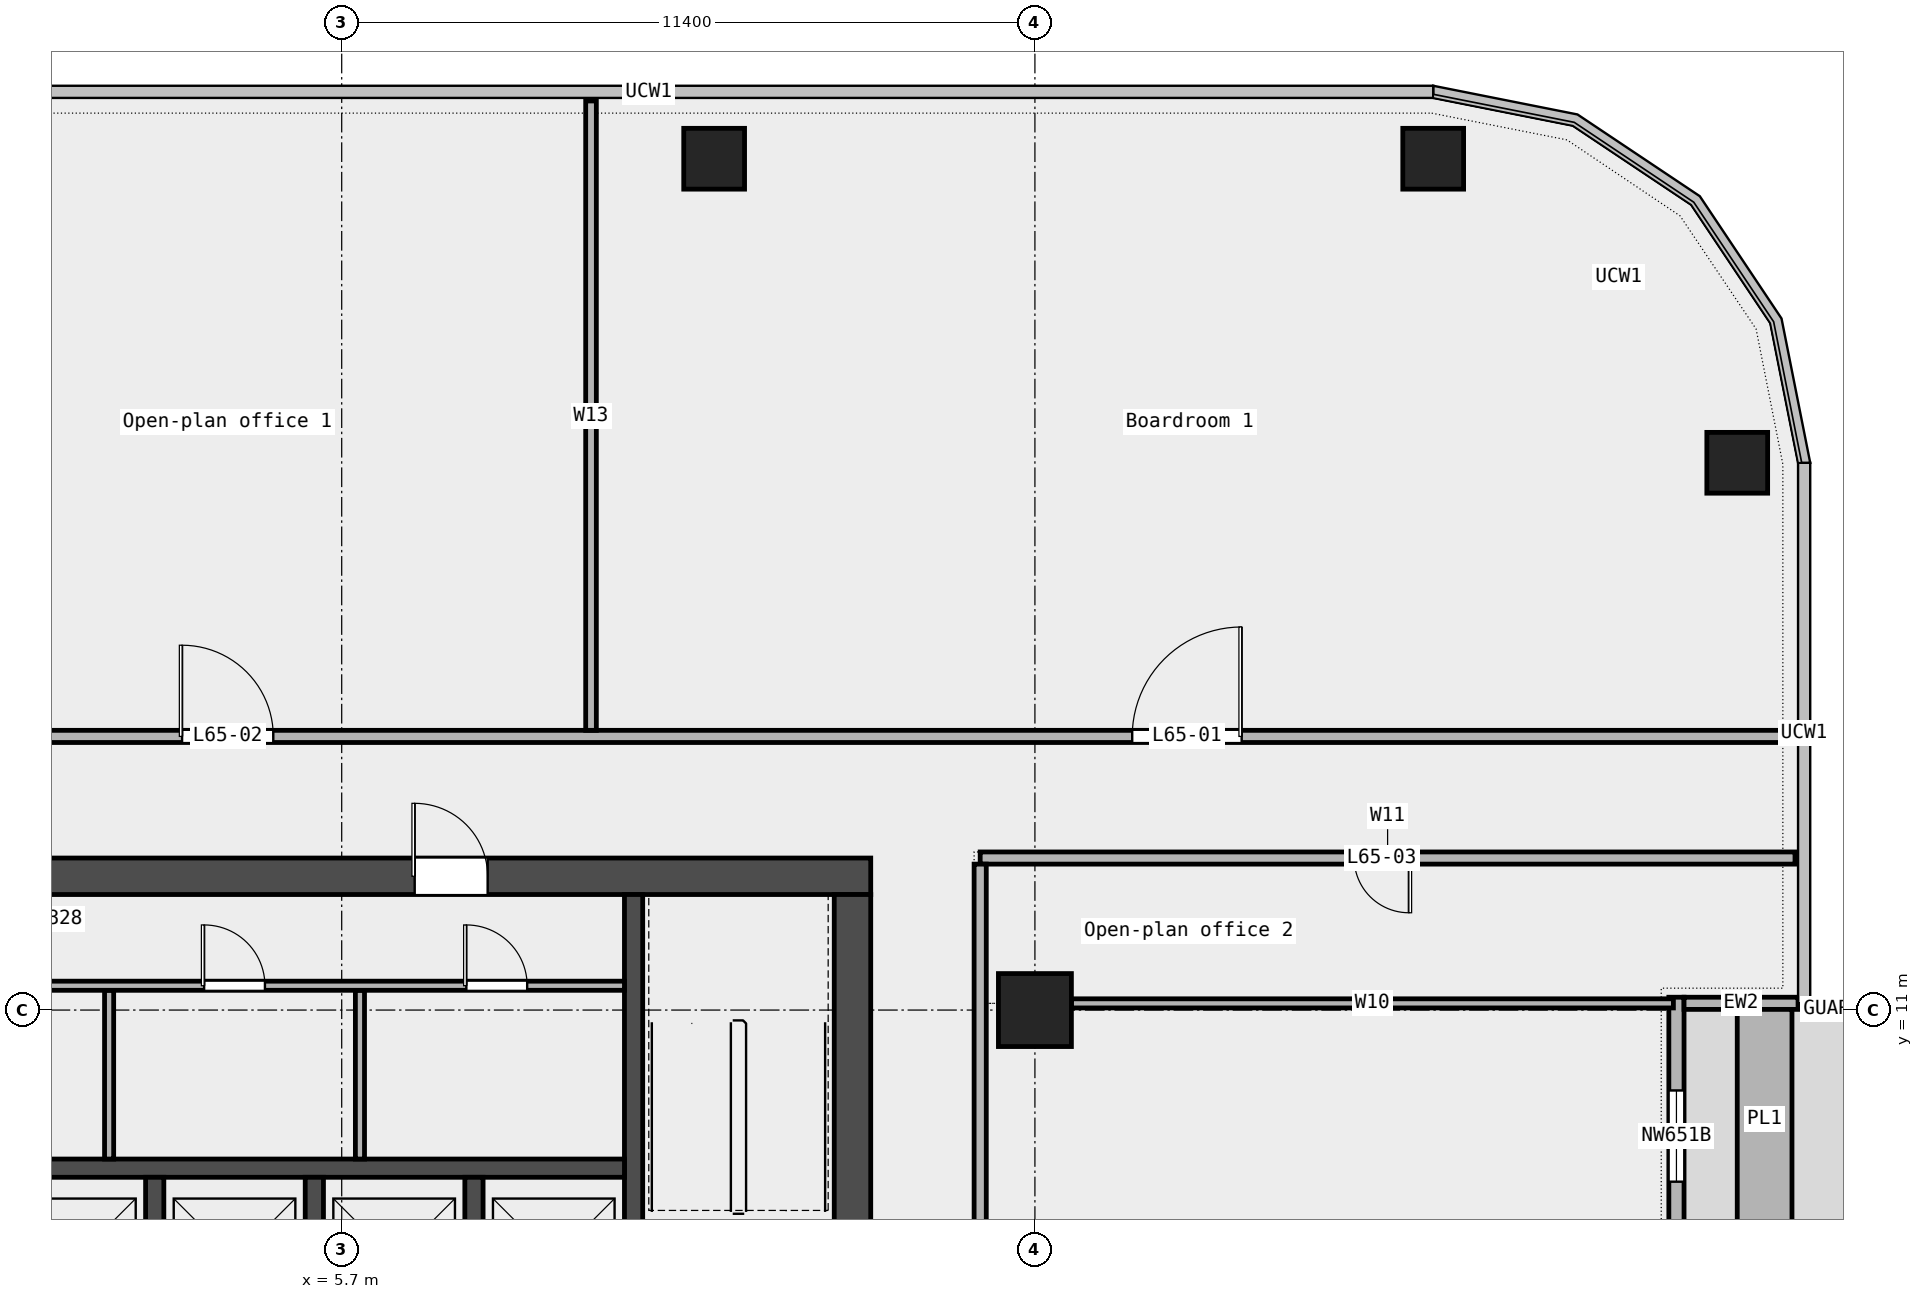
"""IFC4 building model, lengths in metres.
Left out: names, types, materials, properties, quantities, classifications, styles, units other than length and angle.
Written with IfcOpenShell. Run it as: python <this file> out.ifc"""

import sys

from ifc_helpers import new_model, si_unit, direction, frame, frame_2d, origin, origin_2d, place, context, subcontext, project, spatial, rectangle, extrude, element, fill, save


model = new_model("IFC4")
c1 = context("Model", 3, precision=1e-05, world=origin(), true_north=direction((0.0, 1.0)))
c2 = subcontext(c1, "Body", "Model", "MODEL_VIEW")
j1 = project(units=[si_unit("LENGTHUNIT", "METRE"), si_unit("PLANEANGLEUNIT", "RADIAN")], contexts=[c1])
p1 = place(None, origin())
s1 = spatial("IfcSite", under=j1, at=p1, CompositionType="ELEMENT")
p2 = place(p1, origin())
s2 = spatial("IfcBuilding", under=s1, at=p2, CompositionType="ELEMENT")
p3 = place(p2, frame((0.0, 0.0, 299.4)))
s3 = spatial("IfcBuildingStorey", under=s2, at=p3, CompositionType="ELEMENT", Elevation=299.4)
for number, where, z_axis, x_axis in (
    (1, (28.65, 20.0, 0.0), (0.0, 0.0, 1.0), (1.0, 0.0, 0.0)),
    (2, (23.65, 25.0, 0.0), (0.0, 0.0, 1.0), (1.0, 0.0, 0.0)),
    (3, (11.825, 25.0, 0.0), (0.0, 0.0, 1.0), (1.0, 0.0, 0.0)),
):
    element("IfcColumn", number, at=place(p3, frame(where, z_axis=z_axis, x_axis=x_axis)), inside=s3, PredefinedType="COLUMN", context=c2, shape_type="SweptSolid", body=[
        extrude(rectangle(XDim=1.0, YDim=1.0, at=origin_2d()), origin(), (0.0, 0.0, 1.0), 3.6),
    ])
p4 = place(p3, frame((17.1, 11.0, 0.0), z_axis=(0.0, 0.0, 1.0), x_axis=(1.0, 0.0, 0.0)))
e4 = element("IfcColumn", 4, at=p4, inside=s3, PredefinedType="COLUMN", context=c2, shape_type="SweptSolid", body=[
    extrude(rectangle(XDim=1.2, YDim=1.2, at=origin_2d()), origin(), (0.0, 0.0, 1.0), 3.6),
])
p5 = place(p3, frame((27.65, -2.322, 0.0), z_axis=(0.0, 0.0, 1.0), x_axis=(0.0, 1.0, 0.0)))
e5 = element("IfcWall", 5, at=p5, inside=s3, PredefinedType="STANDARD", context=c2, shape_type="SweptSolid", body=[
    extrude(rectangle(XDim=13.533, YDim=0.25, at=frame_2d((6.767, 0.0))), origin(), (0.0, 0.0, 1.0), 3.6),
])
p6 = place(p5, frame((1.5, 0.0, 0.45)))
e6 = element("IfcOpeningElement", 6, at=p6, cuts=e5, PredefinedType="OPENING", context=c2, shape_type="SweptSolid", body=[
    extrude(rectangle(XDim=1.5, YDim=2.4, at=frame_2d((0.75, 1.2))), frame((0.0, 0.137, 0.0), z_axis=(0.0, -1.0, 0.0), x_axis=(1.0, 0.0, 0.0)), (0.0, 0.0, 1.0), 0.274),
])
p7 = place(p5, frame((5.75, 0.0, 0.0)))
e7 = element("IfcOpeningElement", 7, at=p7, cuts=e5, PredefinedType="OPENING", context=c2, shape_type="SweptSolid", body=[
    extrude(rectangle(XDim=1.8, YDim=2.4, at=frame_2d((0.9, 1.2))), frame((0.0, 0.137, 0.0), z_axis=(0.0, -1.0, 0.0), x_axis=(1.0, 0.0, 0.0)), (0.0, 0.0, 1.0), 0.274),
])
p8 = place(p5, frame((10.5, 0.0, 0.45)))
e8 = element("IfcOpeningElement", 8, at=p8, cuts=e5, PredefinedType="OPENING", context=c2, shape_type="SweptSolid", body=[
    extrude(rectangle(XDim=1.5, YDim=2.4, at=frame_2d((0.75, 1.2))), frame((0.0, 0.137, 0.0), z_axis=(0.0, -1.0, 0.0), x_axis=(1.0, 0.0, 0.0)), (0.0, 0.0, 1.0), 0.274),
])
p9 = place(p3, frame((29.65, 11.111, 0.0), z_axis=(0.0, 0.0, 1.0), x_axis=(-1.0, 0.0, 0.0)))
e9 = element("IfcWall", 9, at=p9, inside=s3, PredefinedType="STANDARD", context=c2, shape_type="SweptSolid", body=[
    extrude(rectangle(XDim=1.875, YDim=0.2, at=frame_2d((0.938, 0.0))), origin(), (0.0, 0.0, 1.0), 3.6),
])
p10 = place(p3, frame((29.1, 7.411, 0.0), z_axis=(0.0, 0.0, 1.0), x_axis=(0.0, 1.0, 0.0)))
e10 = element("IfcWall", 10, at=p10, inside=s3, PredefinedType="STANDARD", context=c2, shape_type="SweptSolid", body=[
    extrude(rectangle(XDim=3.6, YDim=0.9, at=frame_2d((1.8, 0.0))), origin(), (0.0, 0.0, 1.0), 0.7),
])
p11 = place(p3, frame((17.7, 11.11, 0.0), z_axis=(0.0, 0.0, 1.0), x_axis=(1.0, 0.0, 0.0)))
e11 = element("IfcWall", 11, at=p11, inside=s3, PredefinedType="PARTITIONING", context=c2, shape_type="SweptSolid", body=[
    extrude(rectangle(XDim=9.9, YDim=0.15, at=frame_2d((4.95, 0.0))), origin(), (0.0, 0.0, 1.0), 3.6),
])
p12 = place(p3, frame((16.2, 13.5, 0.0), z_axis=(0.0, 0.0, 1.0), x_axis=(1.0, 0.0, 0.0)))
e12 = element("IfcWall", 12, at=p12, inside=s3, PredefinedType="PARTITIONING", context=c2, shape_type="SweptSolid", body=[
    extrude(rectangle(XDim=13.4, YDim=0.2, at=frame_2d((6.7, 0.0))), origin(), (0.0, 0.0, 1.0), 3.6),
])
p13 = place(p12, frame((6.15, 0.0, 0.0)))
e13 = element("IfcOpeningElement", 13, at=p13, cuts=e12, PredefinedType="OPENING", context=c2, shape_type="SweptSolid", body=[
    extrude(rectangle(XDim=0.9, YDim=2.1, at=frame_2d((0.45, 1.05))), frame((0.0, 0.112, 0.0), z_axis=(0.0, -1.0, 0.0), x_axis=(1.0, 0.0, 0.0)), (0.0, 0.0, 1.0), 0.224),
])
p14 = place(p3, frame((-29.6, 15.5, 0.0), z_axis=(0.0, 0.0, 1.0), x_axis=(1.0, 0.0, 0.0)))
e14 = element("IfcWall", 14, at=p14, inside=s3, PredefinedType="PARTITIONING", context=c2, shape_type="SweptSolid", body=[
    extrude(rectangle(XDim=59.2, YDim=0.2, at=frame_2d((29.6, 0.0))), origin(), (0.0, 0.0, 1.0), 3.6),
])
p15 = place(p14, frame((48.3, 0.0, 0.0)))
e15 = element("IfcOpeningElement", 15, at=p15, cuts=e14, PredefinedType="OPENING", context=c2, shape_type="SweptSolid", body=[
    extrude(rectangle(XDim=1.8, YDim=2.1, at=frame_2d((0.9, 1.05))), frame((0.0, 0.112, 0.0), z_axis=(0.0, -1.0, 0.0), x_axis=(1.0, 0.0, 0.0)), (0.0, 0.0, 1.0), 0.224),
])
p16 = place(p14, frame((32.675, 0.0, 0.0)))
e16 = element("IfcOpeningElement", 16, at=p16, cuts=e14, PredefinedType="OPENING", context=c2, shape_type="SweptSolid", body=[
    extrude(rectangle(XDim=1.5, YDim=2.1, at=frame_2d((0.75, 1.05))), frame((0.0, 0.112, 0.0), z_axis=(0.0, -1.0, 0.0), x_axis=(1.0, 0.0, 0.0)), (0.0, 0.0, 1.0), 0.224),
])
p17 = place(p14, frame((6.625, 0.0, 0.0)))
e17 = element("IfcOpeningElement", 17, at=p17, cuts=e14, PredefinedType="OPENING", context=c2, shape_type="SweptSolid", body=[
    extrude(rectangle(XDim=1.5, YDim=2.1, at=frame_2d((0.75, 1.05))), frame((0.0, 0.112, 0.0), z_axis=(0.0, -1.0, 0.0), x_axis=(1.0, 0.0, 0.0)), (0.0, 0.0, 1.0), 0.224),
])
p18 = place(p14, frame((20.25, 0.0, 0.0)))
e18 = element("IfcOpeningElement", 18, at=p18, cuts=e14, PredefinedType="OPENING", context=c2, shape_type="SweptSolid", body=[
    extrude(rectangle(XDim=1.5, YDim=2.1, at=frame_2d((0.75, 1.05))), frame((0.0, 0.112, 0.0), z_axis=(0.0, -1.0, 0.0), x_axis=(1.0, 0.0, 0.0)), (0.0, 0.0, 1.0), 0.224),
])
p19 = place(p3, frame((9.8, 15.6, 0.0), z_axis=(0.0, 0.0, 1.0), x_axis=(0.0, 1.0, 0.0)))
e19 = element("IfcWall", 19, at=p19, inside=s3, PredefinedType="PARTITIONING", context=c2, shape_type="SweptSolid", body=[
    extrude(rectangle(XDim=10.35, YDim=0.175, at=frame_2d((5.175, 0.0))), origin(), (0.0, 0.0, 1.0), 3.6),
])
p20 = place(p3, frame((16.2, -7.1, 0.0), z_axis=(0.0, 0.0, 1.0), x_axis=(0.0, 1.0, 0.0)))
e20 = element("IfcWall", 20, at=p20, inside=s3, PredefinedType="PARTITIONING", context=c2, shape_type="SweptSolid", body=[
    extrude(rectangle(XDim=20.5, YDim=0.2, at=frame_2d((10.25, 0.0))), origin(), (0.0, 0.0, 1.0), 3.6),
])
p21 = place(p20, frame((10.795, 0.0, 0.0)))
e21 = element("IfcOpeningElement", 21, at=p21, cuts=e20, PredefinedType="OPENING", context=c2, shape_type="SweptSolid", body=[
    extrude(rectangle(XDim=1.5, YDim=2.1, at=frame_2d((0.75, 1.05))), frame((0.0, 0.112, 0.0), z_axis=(0.0, -1.0, 0.0), x_axis=(1.0, 0.0, 0.0)), (0.0, 0.0, 1.0), 0.224),
])
p22 = place(p3, frame((-14.4, 13.2, 0.0), z_axis=(0.0, 0.0, 1.0), x_axis=(1.0, 0.0, 0.0)))
e22 = element("IfcWall", 22, at=p22, inside=s3, PredefinedType="SHEAR", context=c2, shape_type="SweptSolid", body=[
    extrude(rectangle(XDim=28.8, YDim=0.6, at=frame_2d((14.4, 0.0))), origin(), (0.0, 0.0, 1.0), 3.7),
])
p23 = place(p22, frame((6.3, 0.0, 0.0)))
e23 = element("IfcOpeningElement", 23, at=p23, cuts=e22, PredefinedType="OPENING", context=c2, shape_type="SweptSolid", body=[
    extrude(rectangle(XDim=1.2, YDim=2.1, at=frame_2d((0.6, 1.05))), frame((0.0, 0.312, 0.0), z_axis=(0.0, -1.0, 0.0), x_axis=(1.0, 0.0, 0.0)), (0.0, 0.0, 1.0), 0.624),
])
p24 = place(p22, frame((21.3, 0.0, 0.0)))
e24 = element("IfcOpeningElement", 24, at=p24, cuts=e22, PredefinedType="OPENING", context=c2, shape_type="SweptSolid", body=[
    extrude(rectangle(XDim=1.2, YDim=2.1, at=frame_2d((0.6, 1.05))), frame((0.0, 0.312, 0.0), z_axis=(0.0, -1.0, 0.0), x_axis=(1.0, 0.0, 0.0)), (0.0, 0.0, 1.0), 0.624),
])
p25 = place(p3, frame((14.1, -6.6, 0.0), z_axis=(0.0, 0.0, 1.0), x_axis=(0.0, 1.0, 0.0)))
e25 = element("IfcWall", 25, at=p25, inside=s3, PredefinedType="SHEAR", context=c2, shape_type="SweptSolid", body=[
    extrude(rectangle(XDim=19.5, YDim=0.6, at=frame_2d((9.75, 0.0))), origin(), (0.0, 0.0, 1.0), 3.7),
])
p26 = place(p25, frame((9.3, 0.0, 0.0)))
e26 = element("IfcOpeningElement", 26, at=p26, cuts=e25, PredefinedType="OPENING", context=c2, shape_type="SweptSolid", body=[
    extrude(rectangle(XDim=1.8, YDim=2.1, at=frame_2d((0.9, 1.05))), frame((0.0, 0.312, 0.0), z_axis=(0.0, -1.0, 0.0), x_axis=(1.0, 0.0, 0.0)), (0.0, 0.0, 1.0), 0.624),
])
p27 = place(p3, frame((10.5, 5.25, 0.0), z_axis=(0.0, 0.0, 1.0), x_axis=(0.0, 1.0, 0.0)))
e27 = element("IfcWall", 27, at=p27, inside=s3, PredefinedType="SHEAR", context=c2, shape_type="SweptSolid", body=[
    extrude(rectangle(XDim=7.65, YDim=0.3, at=frame_2d((3.825, 0.0))), origin(), (0.0, 0.0, 1.0), 3.7),
])
p28 = place(p3, frame((-10.35, 8.4, 0.0), z_axis=(0.0, 0.0, 1.0), x_axis=(1.0, 0.0, 0.0)))
e28 = element("IfcWall", 28, at=p28, inside=s3, PredefinedType="SOLIDWALL", context=c2, shape_type="SweptSolid", body=[
    extrude(rectangle(XDim=20.7, YDim=0.3, at=frame_2d((10.35, 0.0))), origin(), (0.0, 0.0, 1.0), 3.7),
])
for number, where, z_axis, x_axis in (
    (29, (2.625, 5.55, 0.0), (0.0, 0.0, 1.0), (0.0, 1.0, 0.0)),
    (30, (5.25, 5.55, 0.0), (0.0, 0.0, 1.0), (0.0, 1.0, 0.0)),
    (31, (7.875, 5.55, 0.0), (0.0, 0.0, 1.0), (0.0, 1.0, 0.0)),
):
    element("IfcWall", number, at=place(p3, frame(where, z_axis=z_axis, x_axis=x_axis)), inside=s3, PredefinedType="SOLIDWALL", context=c2, shape_type="SweptSolid", body=[
        extrude(rectangle(XDim=2.7, YDim=0.3, at=frame_2d((1.35, 0.0))), origin(), (0.0, 0.0, 1.0), 3.7),
    ])
for number, where, z_axis, x_axis in (
    (32, (1.875, 8.55, 0.0), (0.0, 0.0, 1.0), (0.0, 1.0, 0.0)),
    (33, (6.0, 8.55, 0.0), (0.0, 0.0, 1.0), (0.0, 1.0, 0.0)),
):
    element("IfcWall", number, at=place(p3, frame(where, z_axis=z_axis, x_axis=x_axis)), inside=s3, PredefinedType="PARTITIONING", context=c2, shape_type="SweptSolid", body=[
        extrude(rectangle(XDim=2.775, YDim=0.15, at=frame_2d((1.387, 0.0))), origin(), (0.0, 0.0, 1.0), 3.7),
    ])
p29 = place(p3, frame((-10.35, 11.4, 0.0), z_axis=(0.0, 0.0, 1.0), x_axis=(1.0, 0.0, 0.0)))
e34 = element("IfcWall", 34, at=p29, inside=s3, PredefinedType="PARTITIONING", context=c2, shape_type="SweptSolid", body=[
    extrude(rectangle(XDim=20.7, YDim=0.15, at=frame_2d((10.35, 0.0))), origin(), (0.0, 0.0, 1.0), 3.7),
])
p30 = place(p29, frame((1.413, 0.0, 0.0)))
e35 = element("IfcOpeningElement", 35, at=p30, cuts=e34, PredefinedType="OPENING", context=c2, shape_type="SweptSolid", body=[
    extrude(rectangle(XDim=1.0, YDim=2.1, at=frame_2d((0.5, 1.05))), frame((0.0, 0.087, 0.0), z_axis=(0.0, -1.0, 0.0), x_axis=(1.0, 0.0, 0.0)), (0.0, 0.0, 1.0), 0.174),
])
p31 = place(p29, frame((5.538, 0.0, 0.0)))
e36 = element("IfcOpeningElement", 36, at=p31, cuts=e34, PredefinedType="OPENING", context=c2, shape_type="SweptSolid", body=[
    extrude(rectangle(XDim=1.0, YDim=2.1, at=frame_2d((0.5, 1.05))), frame((0.0, 0.087, 0.0), z_axis=(0.0, -1.0, 0.0), x_axis=(1.0, 0.0, 0.0)), (0.0, 0.0, 1.0), 0.174),
])
p32 = place(p29, frame((9.663, 0.0, 0.0)))
e37 = element("IfcOpeningElement", 37, at=p32, cuts=e34, PredefinedType="OPENING", context=c2, shape_type="SweptSolid", body=[
    extrude(rectangle(XDim=1.0, YDim=2.1, at=frame_2d((0.5, 1.05))), frame((0.0, 0.087, 0.0), z_axis=(0.0, -1.0, 0.0), x_axis=(1.0, 0.0, 0.0)), (0.0, 0.0, 1.0), 0.174),
])
p33 = place(p29, frame((13.788, 0.0, 0.0)))
e38 = element("IfcOpeningElement", 38, at=p33, cuts=e34, PredefinedType="OPENING", context=c2, shape_type="SweptSolid", body=[
    extrude(rectangle(XDim=1.0, YDim=2.1, at=frame_2d((0.5, 1.05))), frame((0.0, 0.087, 0.0), z_axis=(0.0, -1.0, 0.0), x_axis=(1.0, 0.0, 0.0)), (0.0, 0.0, 1.0), 0.174),
])
p34 = place(p29, frame((18.1, 0.0, 0.0)))
e39 = element("IfcOpeningElement", 39, at=p34, cuts=e34, PredefinedType="OPENING", context=c2, shape_type="SweptSolid", body=[
    extrude(rectangle(XDim=1.0, YDim=2.1, at=frame_2d((0.5, 1.05))), frame((0.0, 0.087, 0.0), z_axis=(0.0, -1.0, 0.0), x_axis=(1.0, 0.0, 0.0)), (0.0, 0.0, 1.0), 0.174),
])
p35 = place(p8, origin())
e40 = element("IfcWindow", 40, at=p35, inside=s3, PartitioningType="SINGLE_PANEL", PredefinedType="WINDOW", context=c2, shape_type="SweptSolid", body=[
    extrude(rectangle(XDim=1.5, YDim=2.4, at=frame_2d((0.75, 1.2))), frame((0.0, 0.03, 0.0), z_axis=(0.0, -1.0, 0.0), x_axis=(1.0, 0.0, 0.0)), (0.0, 0.0, 1.0), 0.06),
])
fill(e8, e40)
p36 = place(p15, origin())
e41 = element("IfcDoor", 41, at=p36, inside=s3, OperationType="DOUBLE_DOOR_SINGLE_SWING", PredefinedType="DOOR", context=c2, shape_type="SweptSolid", body=[
    extrude(rectangle(XDim=1.8, YDim=2.1, at=frame_2d((0.9, 1.05))), frame((0.0, 0.025, 0.0), z_axis=(0.0, -1.0, 0.0), x_axis=(1.0, 0.0, 0.0)), (0.0, 0.0, 1.0), 0.05),
])
fill(e15, e41)
p37 = place(p16, origin())
e42 = element("IfcDoor", 42, at=p37, inside=s3, OperationType="DOUBLE_DOOR_SINGLE_SWING", PredefinedType="DOOR", context=c2, shape_type="SweptSolid", body=[
    extrude(rectangle(XDim=1.5, YDim=2.1, at=frame_2d((0.75, 1.05))), frame((0.0, 0.025, 0.0), z_axis=(0.0, -1.0, 0.0), x_axis=(1.0, 0.0, 0.0)), (0.0, 0.0, 1.0), 0.05),
])
fill(e16, e42)
p38 = place(p13, origin())
e43 = element("IfcDoor", 43, at=p38, inside=s3, OperationType="SINGLE_SWING_LEFT", PredefinedType="DOOR", context=c2, shape_type="SweptSolid", body=[
    extrude(rectangle(XDim=0.9, YDim=2.1, at=frame_2d((0.45, 1.05))), frame((0.0, 0.025, 0.0), z_axis=(0.0, -1.0, 0.0), x_axis=(1.0, 0.0, 0.0)), (0.0, 0.0, 1.0), 0.05),
])
fill(e13, e43)
p39 = place(p33, origin())
e44 = element("IfcDoor", 44, at=p39, inside=s3, OperationType="SINGLE_SWING_LEFT", PredefinedType="DOOR", context=c2, shape_type="SweptSolid", body=[
    extrude(rectangle(XDim=1.0, YDim=2.1, at=frame_2d((0.5, 1.05))), frame((0.0, 0.025, 0.0), z_axis=(0.0, -1.0, 0.0), x_axis=(1.0, 0.0, 0.0)), (0.0, 0.0, 1.0), 0.05),
])
fill(e38, e44)
p40 = place(p34, origin())
e45 = element("IfcDoor", 45, at=p40, inside=s3, OperationType="SINGLE_SWING_LEFT", PredefinedType="DOOR", context=c2, shape_type="SweptSolid", body=[
    extrude(rectangle(XDim=1.0, YDim=2.1, at=frame_2d((0.5, 1.05))), frame((0.0, 0.025, 0.0), z_axis=(0.0, -1.0, 0.0), x_axis=(1.0, 0.0, 0.0)), (0.0, 0.0, 1.0), 0.05),
])
fill(e39, e45)
p41 = place(p24, origin())
e46 = element("IfcDoor", 46, at=p41, inside=s3, OperationType="SINGLE_SWING_RIGHT", PredefinedType="DOOR", context=c2, shape_type="SweptSolid", body=[
    extrude(rectangle(XDim=1.2, YDim=2.1, at=frame_2d((0.6, 1.05))), frame((0.0, 0.025, 0.0), z_axis=(0.0, -1.0, 0.0), x_axis=(1.0, 0.0, 0.0)), (0.0, 0.0, 1.0), 0.05),
])
fill(e24, e46)
save(model, sys.argv[1])
